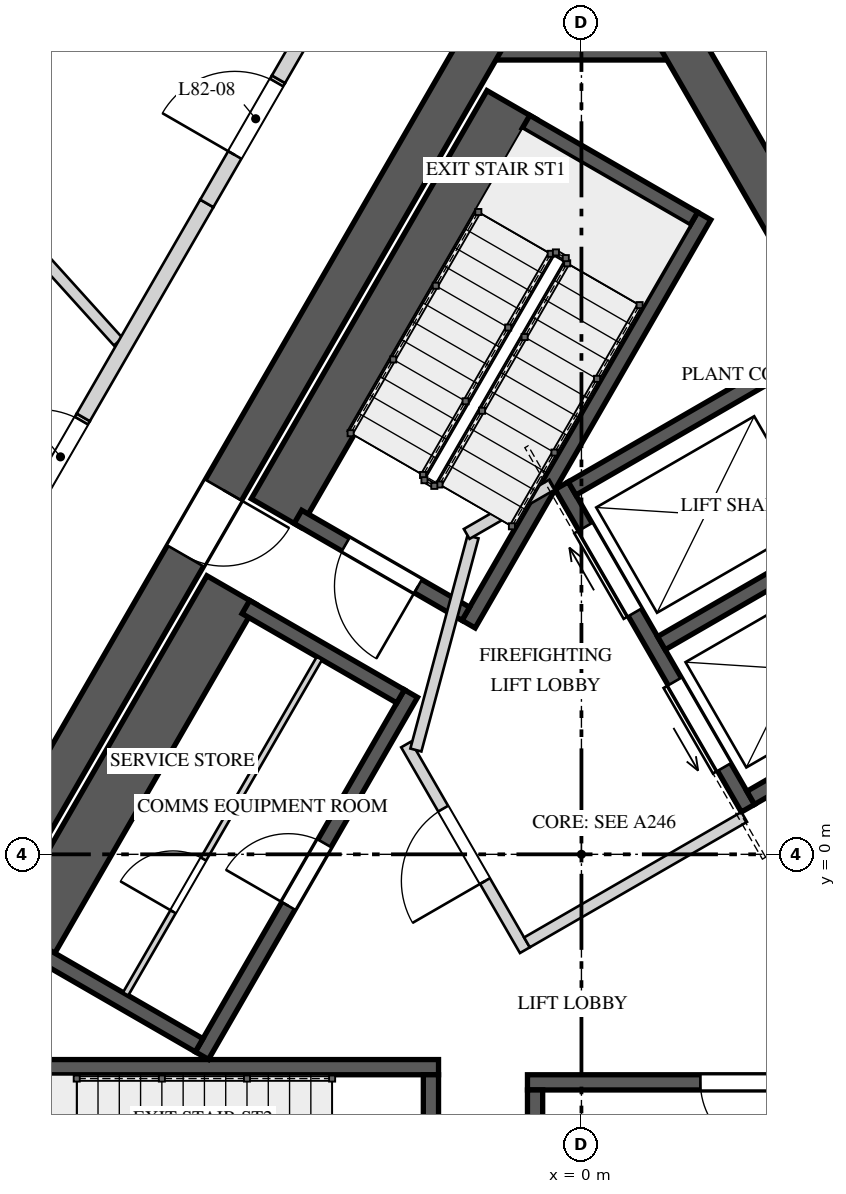
"""IFC4 building model, lengths in metres.
Left out: names, types, materials, properties, quantities, classifications, styles, units other than length and angle.
Written with IfcOpenShell. Run it as: python <this file> out.ifc"""

import sys

from ifc_helpers import new_model, si_unit, direction, frame, frame_2d, origin, place, context, subcontext, project, spatial, polyline, rectangle, outline, extrude, element, fill, save


model = new_model("IFC4")
c1 = context("Model", 3, precision=1e-05, world=origin(), true_north=direction((0.0, 1.0)))
c2 = subcontext(c1, "Body", "Model", "MODEL_VIEW")
j1 = project(units=[si_unit("LENGTHUNIT", "METRE"), si_unit("PLANEANGLEUNIT", "RADIAN")], contexts=[c1])
p1 = place(None, origin())
s1 = spatial("IfcSite", under=j1, at=p1, CompositionType="ELEMENT")
p2 = place(p1, origin())
s2 = spatial("IfcBuilding", under=s1, at=p2, CompositionType="ELEMENT")
p3 = place(p2, frame((0.0, 0.0, 356.9)))
s3 = spatial("IfcBuildingStorey", under=s2, at=p3, CompositionType="ELEMENT", Elevation=356.9)
p4 = place(p3, frame((1.443, 10.725, 0.0), z_axis=(0.0, 0.0, 1.0), x_axis=(-1.0, 0.0, 0.0)))
e1 = element("IfcWall", 1, at=p4, inside=s3, PredefinedType="SHEAR", context=c2, shape_type="SweptSolid", body=[
    extrude(rectangle(XDim=2.887, YDim=0.55, at=frame_2d((1.443, 0.0))), origin(), (0.0, 0.0, 1.0), 4.5),
])
p5 = place(p3, frame((-1.285, 10.725, 0.0), z_axis=(0.0, 0.0, 1.0), x_axis=(-0.499994590896, -0.86602852671, 0.0)))
e2 = element("IfcWall", 2, at=p5, inside=s3, PredefinedType="SHEAR", context=c2, shape_type="SweptSolid", body=[
    extrude(rectangle(XDim=17.292, YDim=0.55, at=frame_2d((8.646, 0.0))), origin(), (0.0, 0.0, 1.0), 4.5),
])
p6 = place(p5, frame((6.851, 0.0, 0.0)))
e3 = element("IfcOpeningElement", 3, at=p6, cuts=e2, PredefinedType="OPENING", context=c2, shape_type="SweptSolid", body=[
    extrude(rectangle(XDim=1.0, YDim=2.4, at=frame_2d((0.5, 1.2))), frame((0.0, 0.285, 0.0), z_axis=(0.0, -1.0, 0.0), x_axis=(1.0, 0.0, 0.0)), (0.0, 0.0, 1.0), 0.57),
])
p7 = place(p5, frame((15.089, 0.0, 0.0)))
e4 = element("IfcOpeningElement", 4, at=p7, cuts=e2, PredefinedType="OPENING", context=c2, shape_type="SweptSolid", body=[
    extrude(rectangle(XDim=0.8, YDim=2.1, at=frame_2d((0.4, 1.05))), frame((0.0, 0.285, 0.0), z_axis=(0.0, -1.0, 0.0), x_axis=(1.0, 0.0, 0.0)), (0.0, 0.0, 1.0), 0.57),
])
p8 = place(p3, frame((9.93, -4.25, 0.0), z_axis=(0.0, 0.0, 1.0), x_axis=(-0.499994590896, 0.86602852671, 0.0)))
e5 = element("IfcWall", 5, at=p8, inside=s3, PredefinedType="SHEAR", context=c2, shape_type="SweptSolid", body=[
    extrude(rectangle(XDim=17.292, YDim=0.55, at=frame_2d((8.646, 0.0))), origin(), (0.0, 0.0, 1.0), 4.5),
])
p9 = place(p8, frame((6.921, 0.0, 0.0)))
e6 = element("IfcOpeningElement", 6, at=p9, cuts=e5, PredefinedType="OPENING", context=c2, shape_type="SweptSolid", body=[
    extrude(rectangle(XDim=1.0, YDim=2.4, at=frame_2d((0.5, 1.2))), frame((0.0, 0.285, 0.0), z_axis=(0.0, -1.0, 0.0), x_axis=(1.0, 0.0, 0.0)), (0.0, 0.0, 1.0), 0.57),
])
p10 = place(p3, frame((-0.918, 9.86, 0.0), z_axis=(0.0, 0.0, 1.0), x_axis=(-0.500026960575, -0.86600983753, 0.0)))
e7 = element("IfcWall", 7, at=p10, inside=s3, PredefinedType="SOLIDWALL", context=c2, shape_type="SweptSolid", body=[
    extrude(rectangle(XDim=6.2, YDim=0.75, at=frame_2d((3.1, 0.0))), origin(), (0.0, 0.0, 1.0), 4.15),
])
p11 = place(p3, frame((1.615, 8.397, 0.0), z_axis=(0.0, 0.0, 1.0), x_axis=(-0.500009909098, -0.866019682689, 0.0)))
e8 = element("IfcWall", 8, at=p11, inside=s3, PredefinedType="SOLIDWALL", context=c2, shape_type="SweptSolid", body=[
    extrude(rectangle(XDim=6.2, YDim=0.2, at=frame_2d((3.1, 0.0))), origin(), (0.0, 0.0, 1.0), 4.15),
])
p12 = place(p3, frame((1.479, 8.361, 0.0), z_axis=(0.0, 0.0, 1.0), x_axis=(-0.865989465428, 0.500062241894, 0.0)))
e9 = element("IfcWall", 9, at=p12, inside=s3, PredefinedType="SOLIDWALL", context=c2, shape_type="SweptSolid", body=[
    extrude(rectangle(XDim=2.55, YDim=0.2, at=frame_2d((1.275, 0.0))), origin(), (0.0, 0.0, 1.0), 4.15),
])
p13 = place(p3, frame((-1.521, 3.165, 0.0), z_axis=(0.0, 0.0, 1.0), x_axis=(-0.866030925526, 0.499990435942, 0.0)))
e10 = element("IfcWall", 10, at=p13, inside=s3, PredefinedType="SOLIDWALL", context=c2, shape_type="SweptSolid", body=[
    extrude(rectangle(XDim=2.55, YDim=0.2, at=frame_2d((1.275, 0.0))), origin(), (0.0, 0.0, 1.0), 4.15),
])
p14 = place(p13, frame((0.725, 0.0, 0.0)))
e11 = element("IfcOpeningElement", 11, at=p14, cuts=e10, PredefinedType="OPENING", context=c2, shape_type="SweptSolid", body=[
    extrude(rectangle(XDim=1.1, YDim=2.4, at=frame_2d((0.55, 1.2))), frame((0.0, 0.11, 0.0), z_axis=(0.0, -1.0, 0.0), x_axis=(1.0, 0.0, 0.0)), (0.0, 0.0, 1.0), 0.22),
])
p15 = place(p3, frame((-8.08, -2.8, 0.0), z_axis=(0.0, 0.0, 1.0), x_axis=(1.0, 0.0, 0.0)))
e12 = element("IfcWall", 12, at=p15, inside=s3, PredefinedType="SOLIDWALL", context=c2, shape_type="SweptSolid", body=[
    extrude(rectangle(XDim=6.2, YDim=0.2, at=frame_2d((3.1, 0.0))), origin(), (0.0, 0.0, 1.0), 4.15),
])
p16 = place(p3, frame((-1.98, -2.9, 0.0), z_axis=(0.0, 0.0, 1.0), x_axis=(0.0, -1.0, 0.0)))
e13 = element("IfcWall", 13, at=p16, inside=s3, PredefinedType="SOLIDWALL", context=c2, shape_type="SweptSolid", body=[
    extrude(rectangle(XDim=2.55, YDim=0.2, at=frame_2d((1.275, 0.0))), origin(), (0.0, 0.0, 1.0), 4.15),
])
p17 = place(p16, frame((0.725, 0.0, 0.0)))
e14 = element("IfcOpeningElement", 14, at=p17, cuts=e13, PredefinedType="OPENING", context=c2, shape_type="SweptSolid", body=[
    extrude(rectangle(XDim=1.1, YDim=2.4, at=frame_2d((0.55, 1.2))), frame((0.0, 0.11, 0.0), z_axis=(0.0, -1.0, 0.0), x_axis=(1.0, 0.0, 0.0)), (0.0, 0.0, 1.0), 0.22),
])
p18 = place(p3, frame((-4.993, -2.648, 0.0), z_axis=(0.0, 0.0, 1.0), x_axis=(0.499996545922, 0.866027397988, 0.0)))
e15 = element("IfcWall", 15, at=p18, inside=s3, PredefinedType="SOLIDWALL", context=c2, shape_type="SweptSolid", body=[
    extrude(rectangle(XDim=5.5, YDim=0.2, at=frame_2d((2.75, 0.0))), origin(), (0.0, 0.0, 1.0), 4.15),
])
p19 = place(p18, frame((2.275, 0.0, 0.0)))
e16 = element("IfcOpeningElement", 16, at=p19, cuts=e15, PredefinedType="OPENING", context=c2, shape_type="SweptSolid", body=[
    extrude(rectangle(XDim=0.95, YDim=2.4, at=frame_2d((0.475, 1.2))), frame((0.0, 0.11, 0.0), z_axis=(0.0, -1.0, 0.0), x_axis=(1.0, 0.0, 0.0)), (0.0, 0.0, 1.0), 0.22),
])
p20 = place(p3, frame((-4.603, 3.477, 0.0), z_axis=(0.0, 0.0, 1.0), x_axis=(-0.500015767406, -0.866016300277, 0.0)))
e17 = element("IfcWall", 17, at=p20, inside=s3, PredefinedType="SOLIDWALL", context=c2, shape_type="SweptSolid", body=[
    extrude(rectangle(XDim=5.5, YDim=0.75, at=frame_2d((2.75, 0.0))), origin(), (0.0, 0.0, 1.0), 4.15),
])
p21 = place(p3, frame((-2.38, 2.078, 0.0), z_axis=(0.0, 0.0, 1.0), x_axis=(-0.866061024631, 0.499938297808, 0.0)))
e18 = element("IfcWall", 18, at=p21, inside=s3, PredefinedType="SOLIDWALL", context=c2, shape_type="SweptSolid", body=[
    extrude(rectangle(XDim=2.35, YDim=0.2, at=frame_2d((1.175, 0.0))), origin(), (0.0, 0.0, 1.0), 4.15),
])
p22 = place(p3, frame((-5.03, -2.512, 0.0), z_axis=(0.0, 0.0, 1.0), x_axis=(-0.866016039709, 0.500016218704, 0.0)))
e19 = element("IfcWall", 19, at=p22, inside=s3, PredefinedType="SOLIDWALL", context=c2, shape_type="SweptSolid", body=[
    extrude(rectangle(XDim=2.35, YDim=0.2, at=frame_2d((1.175, 0.0))), origin(), (0.0, 0.0, 1.0), 4.15),
])
p23 = place(p3, frame((-5.997, -1.838, 0.0), z_axis=(0.0, 0.0, 1.0), x_axis=(0.500005610874, 0.86602216432, 0.0)))
e20 = element("IfcWall", 20, at=p23, inside=s3, PredefinedType="PARTITIONING", context=c2, shape_type="SweptSolid", body=[
    extrude(rectangle(XDim=5.1, YDim=0.08, at=frame_2d((2.55, 0.0))), origin(), (0.0, 0.0, 1.0), 4.15),
])
p24 = place(p23, frame((1.25, 0.0, 0.0)))
e21 = element("IfcOpeningElement", 21, at=p24, cuts=e20, PredefinedType="OPENING", context=c2, shape_type="SweptSolid", body=[
    extrude(rectangle(XDim=0.8, YDim=2.1, at=frame_2d((0.4, 1.05))), frame((0.0, 0.05, 0.0), z_axis=(0.0, -1.0, 0.0), x_axis=(1.0, 0.0, 0.0)), (0.0, 0.0, 1.0), 0.1),
])
p25 = place(p3, frame((4.79, -3.0, 0.0), z_axis=(0.0, 0.0, 1.0), x_axis=(-1.0, 0.0, 0.0)))
e22 = element("IfcWall", 22, at=p25, inside=s3, PredefinedType="SOLIDWALL", context=c2, shape_type="SweptSolid", body=[
    extrude(rectangle(XDim=5.5, YDim=0.2, at=frame_2d((2.75, 0.0))), origin(), (0.0, 0.0, 1.0), 4.15),
])
p26 = place(p25, frame((2.275, 0.0, 0.0)))
e23 = element("IfcOpeningElement", 23, at=p26, cuts=e22, PredefinedType="OPENING", context=c2, shape_type="SweptSolid", body=[
    extrude(rectangle(XDim=0.95, YDim=2.4, at=frame_2d((0.475, 1.2))), frame((0.0, 0.11, 0.0), z_axis=(0.0, -1.0, 0.0), x_axis=(1.0, 0.0, 0.0)), (0.0, 0.0, 1.0), 0.22),
])
p27 = place(p3, frame((-0.61, -3.1, 0.0), z_axis=(0.0, 0.0, 1.0), x_axis=(0.0, -1.0, 0.0)))
e24 = element("IfcWall", 24, at=p27, inside=s3, PredefinedType="SOLIDWALL", context=c2, shape_type="SweptSolid", body=[
    extrude(rectangle(XDim=2.35, YDim=0.2, at=frame_2d((1.175, 0.0))), origin(), (0.0, 0.0, 1.0), 4.15),
])
p28 = place(p3, frame((2.19, 0.606, 0.0), z_axis=(0.0, 0.0, 1.0), x_axis=(-0.500002801628, 0.866023786258, 0.0)))
e25 = element("IfcWall", 25, at=p28, inside=s3, PredefinedType="SOLIDWALL", context=c2, shape_type="SweptSolid", body=[
    extrude(rectangle(XDim=4.9, YDim=0.2, at=frame_2d((2.45, 0.0))), origin(), (0.0, 0.0, 1.0), 4.15),
])
p29 = place(p28, frame((0.625, 0.0, 0.0)))
e26 = element("IfcOpeningElement", 26, at=p29, cuts=e25, PredefinedType="OPENING", context=c2, shape_type="SweptSolid", body=[
    extrude(rectangle(XDim=1.3, YDim=2.1, at=frame_2d((0.65, 1.05))), frame((0.0, 0.11, 0.0), z_axis=(0.0, -1.0, 0.0), x_axis=(1.0, 0.0, 0.0)), (0.0, 0.0, 1.0), 0.22),
])
p30 = place(p28, frame((2.975, 0.0, 0.0)))
e27 = element("IfcOpeningElement", 27, at=p30, cuts=e25, PredefinedType="OPENING", context=c2, shape_type="SweptSolid", body=[
    extrude(rectangle(XDim=1.3, YDim=2.1, at=frame_2d((0.65, 1.05))), frame((0.0, 0.11, 0.0), z_axis=(0.0, -1.0, 0.0), x_axis=(1.0, 0.0, 0.0)), (0.0, 0.0, 1.0), 0.22),
])
for number, where, z_axis, x_axis in (
    (28, (2.227, 0.743, 0.0), (0.0, 0.0, 1.0), (0.866, 0.5, 0.0)),
    (29, (1.052, 2.778, 0.0), (0.0, 0.0, 1.0), (0.866, 0.5, 0.0)),
    (30, (-0.123, 4.813, 0.0), (0.0, 0.0, 1.0), (0.866, 0.5, 0.0)),
):
    element("IfcWall", number, at=place(p3, frame(where, z_axis=z_axis, x_axis=x_axis)), inside=s3, PredefinedType="SOLIDWALL", context=c2, shape_type="SweptSolid", body=[
        extrude(rectangle(XDim=3.15, YDim=0.2, at=frame_2d((1.575, 0.0))), origin(), (0.0, 0.0, 1.0), 4.15),
    ])
p31 = place(p3, frame((-0.744, -1.261, 0.0), z_axis=(0.0, 0.0, 1.0), x_axis=(-0.500004234368, 0.866022959057, 0.0)))
e31 = element("IfcWall", 31, at=p31, inside=s3, PredefinedType="PARTITIONING", context=c2, shape_type="SweptSolid", body=[
    extrude(rectangle(XDim=3.125, YDim=0.15, at=frame_2d((1.562, 0.0))), origin(), (0.0, 0.0, 1.0), 4.15),
])
p32 = place(p31, frame((1.05, 0.0, 0.0)))
e32 = element("IfcOpeningElement", 32, at=p32, cuts=e31, PredefinedType="OPENING", context=c2, shape_type="SweptSolid", body=[
    extrude(rectangle(XDim=1.1, YDim=2.4, at=frame_2d((0.55, 1.2))), frame((0.0, 0.085, 0.0), z_axis=(0.0, -1.0, 0.0), x_axis=(1.0, 0.0, 0.0)), (0.0, 0.0, 1.0), 0.17),
])
p33 = place(p3, frame((-0.717, -1.159, 0.0), z_axis=(0.0, 0.0, 1.0), x_axis=(0.866008176907, 0.50002983664, 0.0)))
e33 = element("IfcWall", 33, at=p33, inside=s3, PredefinedType="PARTITIONING", context=c2, shape_type="SweptSolid", body=[
    extrude(rectangle(XDim=3.3, YDim=0.15, at=frame_2d((1.65, 0.0))), origin(), (0.0, 0.0, 1.0), 4.15),
])
p34 = place(p3, frame((-2.178, 1.372, 0.0), z_axis=(0.0, 0.0, 1.0), x_axis=(0.258808958833, 0.96592852884, 0.0)))
e34 = element("IfcWall", 34, at=p34, inside=s3, PredefinedType="PARTITIONING", context=c2, shape_type="SweptSolid", body=[
    extrude(rectangle(XDim=2.903, YDim=0.15, at=frame_2d((1.451, 0.0))), origin(), (0.0, 0.0, 1.0), 4.15),
])
p35 = place(p3, frame((-1.51, 4.215, 0.0), z_axis=(0.0, 0.0, 1.0), x_axis=(0.866085525409, 0.49989585183, 0.0)))
e35 = element("IfcWall", 35, at=p35, inside=s3, PredefinedType="PARTITIONING", context=c2, shape_type="SweptSolid", body=[
    extrude(rectangle(XDim=1.3, YDim=0.15, at=frame_2d((0.65, 0.0))), origin(), (0.0, 0.0, 1.0), 4.15),
])
p36 = place(p3, frame((-9.261, 10.248, 0.0), z_axis=(0.0, 0.0, 1.0), x_axis=(0.670485503808, -0.741922630187, 0.0)))
e36 = element("IfcWall", 36, at=p36, inside=s3, PredefinedType="PARTITIONING", context=c2, shape_type="SweptSolid", body=[
    extrude(rectangle(XDim=4.723, YDim=0.15, at=frame_2d((2.362, 0.0))), origin(), (0.0, 0.0, 1.0), 4.15),
])
p37 = place(p3, frame((-7.154, 4.709, 0.0), z_axis=(0.0, 0.0, 1.0), x_axis=(0.500033551112, 0.866006032174, 0.0)))
e37 = element("IfcWall", 37, at=p37, inside=s3, PredefinedType="SOLIDWALL", context=c2, shape_type="SweptSolid", body=[
    extrude(outline(polyline([(0.0, 0.0), (1.2, 0.0), (1.2, 4.15), (1.027, 4.15), (1.027, 3.25), (0.22, 3.25), (0.22, 4.15), (0.0, 4.15), (0.0, 0.0)])), frame((0.0, 0.1, 0.0), z_axis=(0.0, -1.0, 0.0), x_axis=(1.0, 0.0, 0.0)), (0.0, 0.0, 1.0), 0.2),
])
p38 = place(p37, frame((0.05, 0.0, 0.0)))
e38 = element("IfcOpeningElement", 38, at=p38, cuts=e37, PredefinedType="OPENING", context=c2, shape_type="SweptSolid", body=[
    extrude(rectangle(XDim=1.1, YDim=2.4, at=frame_2d((0.55, 1.2))), frame((0.0, 0.11, 0.0), z_axis=(0.0, -1.0, 0.0), x_axis=(1.0, 0.0, 0.0)), (0.0, 0.0, 1.0), 0.22),
])
p39 = place(p3, frame((-6.554, 5.749, 0.0), z_axis=(0.0, 0.0, 1.0), x_axis=(0.499984717929, 0.866034226713, 0.0)))
e39 = element("IfcWall", 39, at=p39, inside=s3, PredefinedType="SOLIDWALL", context=c2, shape_type="SweptSolid", body=[
    extrude(rectangle(XDim=3.25, YDim=0.2, at=frame_2d((1.625, 0.0))), origin(), (0.0, 0.0, 1.0), 4.15),
])
p40 = place(p3, frame((-4.929, 8.563, 0.0), z_axis=(0.0, 0.0, 1.0), x_axis=(0.49999508309, 0.866028242545, 0.0)))
e40 = element("IfcWall", 40, at=p40, inside=s3, PredefinedType="SOLIDWALL", context=c2, shape_type="SweptSolid", body=[
    extrude(outline(polyline([(0.0, 0.0), (1.886, 0.0), (1.886, 4.15), (0.826, 4.15), (0.826, 3.45), (0.0, 3.45), (0.0, 0.0)])), frame((0.0, 0.1, 0.0), z_axis=(0.0, -1.0, 0.0), x_axis=(1.0, 0.0, 0.0)), (0.0, 0.0, 1.0), 0.2),
])
p41 = place(p40, frame((0.736, 0.0, 0.0)))
e41 = element("IfcOpeningElement", 41, at=p41, cuts=e40, PredefinedType="OPENING", context=c2, shape_type="SweptSolid", body=[
    extrude(rectangle(XDim=1.1, YDim=2.4, at=frame_2d((0.55, 1.2))), frame((0.0, 0.11, 0.0), z_axis=(0.0, -1.0, 0.0), x_axis=(1.0, 0.0, 0.0)), (0.0, 0.0, 1.0), 0.22),
])
p42 = place(p3, frame((-3.986, 10.197, 0.0), z_axis=(0.0, 0.0, 1.0), x_axis=(0.499982583329, 0.866035459071, 0.0)))
e42 = element("IfcWall", 42, at=p42, inside=s3, PredefinedType="SOLIDWALL", context=c2, shape_type="SweptSolid", body=[
    extrude(rectangle(XDim=3.006, YDim=0.2, at=frame_2d((1.503, 0.0))), origin(), (0.0, 0.0, 1.0), 4.15),
])
p43 = place(p3, frame((2.483, 12.8, 0.0), z_axis=(0.0, 0.0, 1.0), x_axis=(0.499982771656, -0.866035350345, 0.0)))
e43 = element("IfcWall", 43, at=p43, inside=s3, PredefinedType="SOLIDWALL", context=c2, shape_type="SweptSolid", body=[
    extrude(rectangle(XDim=4.195, YDim=0.2, at=frame_2d((2.097, 0.0))), origin(), (0.0, 0.0, 1.0), 4.15),
])
p44 = place(p14, origin())
e44 = element("IfcDoor", 44, at=p44, inside=s3, OperationType="SINGLE_SWING_RIGHT", PredefinedType="DOOR", context=c2, shape_type="SweptSolid", body=[
    extrude(rectangle(XDim=1.1, YDim=2.4, at=frame_2d((0.55, 1.2))), frame((0.0, 0.025, 0.0), z_axis=(0.0, -1.0, 0.0), x_axis=(1.0, 0.0, 0.0)), (0.0, 0.0, 1.0), 0.05),
])
fill(e11, e44)
p45 = place(p19, origin())
e45 = element("IfcDoor", 45, at=p45, inside=s3, OperationType="SINGLE_SWING_LEFT", PredefinedType="DOOR", context=c2, shape_type="SweptSolid", body=[
    extrude(rectangle(XDim=0.95, YDim=2.4, at=frame_2d((0.475, 1.2))), frame((0.0, 0.025, 0.0), z_axis=(0.0, -1.0, 0.0), x_axis=(1.0, 0.0, 0.0)), (0.0, 0.0, 1.0), 0.05),
])
fill(e16, e45)
p46 = place(p24, origin())
e46 = element("IfcDoor", 46, at=p46, inside=s3, OperationType="SINGLE_SWING_RIGHT", PredefinedType="DOOR", context=c2, shape_type="SweptSolid", body=[
    extrude(rectangle(XDim=0.8, YDim=2.1, at=frame_2d((0.4, 1.05))), frame((0.0, 0.025, 0.0), z_axis=(0.0, -1.0, 0.0), x_axis=(1.0, 0.0, 0.0)), (0.0, 0.0, 1.0), 0.05),
])
fill(e21, e46)
p47 = place(p26, origin())
e47 = element("IfcDoor", 47, at=p47, inside=s3, OperationType="SINGLE_SWING_LEFT", PredefinedType="DOOR", context=c2, shape_type="SweptSolid", body=[
    extrude(rectangle(XDim=0.95, YDim=2.4, at=frame_2d((0.475, 1.2))), frame((0.0, 0.025, 0.0), z_axis=(0.0, -1.0, 0.0), x_axis=(1.0, 0.0, 0.0)), (0.0, 0.0, 1.0), 0.05),
])
fill(e23, e47)
p48 = place(p29, origin())
e48 = element("IfcDoor", 48, at=p48, inside=s3, OperationType="SLIDING_TO_LEFT", PredefinedType="DOOR", context=c2, shape_type="SweptSolid", body=[
    extrude(rectangle(XDim=1.3, YDim=2.1, at=frame_2d((0.65, 1.05))), frame((0.0, 0.025, 0.0), z_axis=(0.0, -1.0, 0.0), x_axis=(1.0, 0.0, 0.0)), (0.0, 0.0, 1.0), 0.05),
])
fill(e26, e48)
p49 = place(p30, origin())
e49 = element("IfcDoor", 49, at=p49, inside=s3, OperationType="SLIDING_TO_RIGHT", PredefinedType="DOOR", context=c2, shape_type="SweptSolid", body=[
    extrude(rectangle(XDim=1.3, YDim=2.1, at=frame_2d((0.65, 1.05))), frame((0.0, 0.025, 0.0), z_axis=(0.0, -1.0, 0.0), x_axis=(1.0, 0.0, 0.0)), (0.0, 0.0, 1.0), 0.05),
])
fill(e27, e49)
p50 = place(p32, origin())
e50 = element("IfcDoor", 50, at=p50, inside=s3, OperationType="SINGLE_SWING_LEFT", PredefinedType="DOOR", context=c2, shape_type="SweptSolid", body=[
    extrude(rectangle(XDim=1.1, YDim=2.4, at=frame_2d((0.55, 1.2))), frame((0.0, 0.025, 0.0), z_axis=(0.0, -1.0, 0.0), x_axis=(1.0, 0.0, 0.0)), (0.0, 0.0, 1.0), 0.05),
])
fill(e32, e50)
p51 = place(p6, origin())
e51 = element("IfcDoor", 51, at=p51, inside=s3, OperationType="SINGLE_SWING_RIGHT", PredefinedType="DOOR", context=c2, shape_type="SweptSolid", body=[
    extrude(rectangle(XDim=1.0, YDim=2.4, at=frame_2d((0.5, 1.2))), frame((0.0, 0.025, 0.0), z_axis=(0.0, -1.0, 0.0), x_axis=(1.0, 0.0, 0.0)), (0.0, 0.0, 1.0), 0.05),
])
fill(e3, e51)
p52 = place(p38, origin())
e52 = element("IfcDoor", 52, at=p52, inside=s3, OperationType="SINGLE_SWING_LEFT", PredefinedType="DOOR", context=c2, shape_type="SweptSolid", body=[
    extrude(rectangle(XDim=1.1, YDim=2.4, at=frame_2d((0.55, 1.2))), frame((0.0, 0.025, 0.0), z_axis=(0.0, -1.0, 0.0), x_axis=(1.0, 0.0, 0.0)), (0.0, 0.0, 1.0), 0.05),
])
fill(e38, e52)
p53 = place(p41, origin())
e53 = element("IfcDoor", 53, at=p53, inside=s3, OperationType="SINGLE_SWING_RIGHT", PredefinedType="DOOR", context=c2, shape_type="SweptSolid", body=[
    extrude(rectangle(XDim=1.1, YDim=2.4, at=frame_2d((0.55, 1.2))), frame((0.0, 0.025, 0.0), z_axis=(0.0, -1.0, 0.0), x_axis=(1.0, 0.0, 0.0)), (0.0, 0.0, 1.0), 0.05),
])
fill(e41, e53)
save(model, sys.argv[1])
